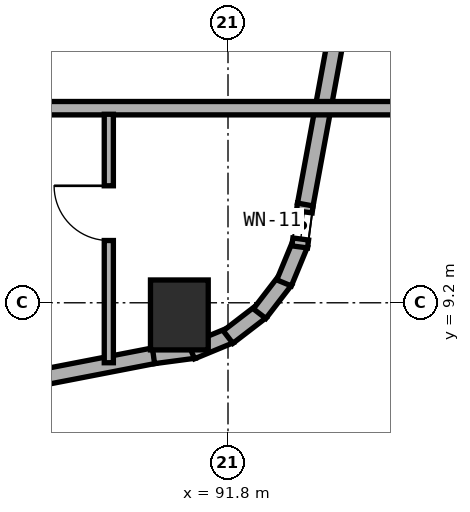
"""IFC4 building model, lengths in metres.
Left out: names, types, materials, properties, quantities, classifications, styles, units other than length and angle.
Written with IfcOpenShell. Run it as: python <this file> out.ifc"""

import sys

from ifc_helpers import new_model, si_unit, direction, frame, frame_2d, origin, origin_2d, place, context, subcontext, project, spatial, rectangle, extrude, element, fill, save


model = new_model("IFC4")
c1 = context("Model", 3, precision=1e-05, world=origin(), true_north=direction((0.0, 1.0)))
c2 = subcontext(c1, "Body", "Model", "MODEL_VIEW")
j1 = project(units=[si_unit("LENGTHUNIT", "METRE"), si_unit("PLANEANGLEUNIT", "RADIAN")], contexts=[c1])
p1 = place(None, origin())
s1 = spatial("IfcSite", under=j1, at=p1, CompositionType="ELEMENT")
p2 = place(p1, origin())
s2 = spatial("IfcBuilding", under=s1, at=p2, CompositionType="ELEMENT")
p3 = place(p2, frame((0.0, 0.0, 124.0)))
s3 = spatial("IfcBuildingStorey", under=s2, at=p3, CompositionType="ELEMENT", Elevation=124.0)
p4 = place(p3, frame((91.0, 9.0, 0.0), z_axis=(0.0, 0.0, 1.0), x_axis=(1.0, 0.0, 0.0)))
e1 = element("IfcColumn", 1, at=p4, inside=s3, PredefinedType="COLUMN", context=c2, shape_type="SweptSolid", body=[
    extrude(rectangle(XDim=0.95, YDim=1.15, at=origin_2d()), origin(), (0.0, 0.0, 1.0), 3.5),
])
p5 = place(p3, frame((82.29, 6.723, 0.0), z_axis=(0.0, 0.0, 1.0), x_axis=(0.981733729692, 0.190260043057, 0.0)))
e2 = element("IfcWall", 2, at=p5, inside=s3, PredefinedType="STANDARD", context=c2, shape_type="SweptSolid", body=[
    extrude(rectangle(XDim=8.447, YDim=0.26, at=frame_2d((4.224, 0.0))), origin(), (0.0, 0.0, 1.0), 3.25),
])
p6 = place(p5, frame((2.608, 0.0, 0.8)))
e3 = element("IfcOpeningElement", 3, at=p6, cuts=e2, PredefinedType="OPENING", context=c2, shape_type="SweptSolid", body=[
    extrude(rectangle(XDim=2.4, YDim=1.6, at=frame_2d((1.2, 0.8))), frame((0.0, 0.14, 0.0), z_axis=(0.0, -1.0, 0.0), x_axis=(1.0, 0.0, 0.0)), (0.0, 0.0, 1.0), 0.28),
])
p7 = place(p3, frame((90.575, 8.328, 0.0), z_axis=(0.0, 0.0, 1.0), x_axis=(0.991300187529, 0.13162043232, 0.0)))
e4 = element("IfcWall", 4, at=p7, inside=s3, PredefinedType="STANDARD", context=c2, shape_type="SweptSolid", body=[
    extrude(rectangle(XDim=0.677, YDim=0.26, at=frame_2d((0.338, 0.0))), origin(), (0.0, 0.0, 1.0), 3.25),
])
for number, where, z_axis, x_axis in (
    (5, (91.2, 8.399, 0.0), (0.0, 0.0, 1.0), (0.924, 0.382, 0.0)),
    (6, (91.801, 8.636, 0.0), (0.0, 0.0, 1.0), (0.793, 0.61, 0.0)),
    (7, (92.32, 9.021, 0.0), (0.0, 0.0, 1.0), (0.609, 0.793, 0.0)),
):
    element("IfcWall", number, at=place(p3, frame(where, z_axis=z_axis, x_axis=x_axis)), inside=s3, PredefinedType="STANDARD", context=c2, shape_type="SweptSolid", body=[
        extrude(rectangle(XDim=0.694, YDim=0.26, at=frame_2d((0.347, 0.0))), origin(), (0.0, 0.0, 1.0), 3.25),
    ])
p8 = place(p3, frame((92.722, 9.527, 0.0), z_axis=(0.0, 0.0, 1.0), x_axis=(0.382289608286, 0.924042561464, 0.0)))
e8 = element("IfcWall", 8, at=p8, inside=s3, PredefinedType="STANDARD", context=c2, shape_type="SweptSolid", body=[
    extrude(rectangle(XDim=0.694, YDim=0.26, at=frame_2d((0.347, 0.0))), origin(), (0.0, 0.0, 1.0), 3.25),
])
p9 = place(p3, frame((92.979, 10.119, 0.0), z_axis=(0.0, 0.0, 1.0), x_axis=(0.130614135366, 0.991433279471, 0.0)))
e9 = element("IfcWall", 9, at=p9, inside=s3, PredefinedType="STANDARD", context=c2, shape_type="SweptSolid", body=[
    extrude(rectangle(XDim=0.712, YDim=0.26, at=frame_2d((0.356, 0.0))), origin(), (0.0, 0.0, 1.0), 3.25),
])
p10 = place(p9, frame((0.131, 0.0, 0.85)))
e10 = element("IfcOpeningElement", 10, at=p10, cuts=e9, PredefinedType="OPENING", context=c2, shape_type="SweptSolid", body=[
    extrude(rectangle(XDim=0.45, YDim=1.5, at=frame_2d((0.225, 0.75))), frame((0.0, 0.14, 0.0), z_axis=(0.0, -1.0, 0.0), x_axis=(1.0, 0.0, 0.0)), (0.0, 0.0, 1.0), 0.28),
])
p11 = place(p3, frame((93.071, 10.816, 0.0), z_axis=(0.0, 0.0, 1.0), x_axis=(0.181209963057, 0.983444431215, 0.0)))
e11 = element("IfcWall", 11, at=p11, inside=s3, PredefinedType="STANDARD", context=c2, shape_type="SweptSolid", body=[
    extrude(rectangle(XDim=8.889, YDim=0.26, at=frame_2d((4.445, 0.0))), origin(), (0.0, 0.0, 1.0), 3.25),
])
p12 = place(p11, frame((5.045, 0.0, 0.8)))
e12 = element("IfcOpeningElement", 12, at=p12, cuts=e11, PredefinedType="OPENING", context=c2, shape_type="SweptSolid", body=[
    extrude(rectangle(XDim=2.4, YDim=1.6, at=frame_2d((1.2, 0.8))), frame((0.0, 0.14, 0.0), z_axis=(0.0, -1.0, 0.0), x_axis=(1.0, 0.0, 0.0)), (0.0, 0.0, 1.0), 0.28),
])
p13 = place(p3, frame((88.35, 12.4, 0.0), z_axis=(0.0, 0.0, 1.0), x_axis=(1.0, 0.0, 0.0)))
e13 = element("IfcWall", 13, at=p13, inside=s3, PredefinedType="SOLIDWALL", context=c2, shape_type="SweptSolid", body=[
    extrude(rectangle(XDim=6.29, YDim=0.22, at=frame_2d((3.145, 0.0))), origin(), (0.0, 0.0, 1.0), 2.945),
])
p14 = place(p3, frame((89.84, 8.214, 0.0), z_axis=(0.0, 0.0, 1.0), x_axis=(0.0, 1.0, 0.0)))
e14 = element("IfcWall", 14, at=p14, inside=s3, PredefinedType="PARTITIONING", context=c2, shape_type="SweptSolid", body=[
    extrude(rectangle(XDim=4.086, YDim=0.15, at=frame_2d((2.043, 0.0))), origin(), (0.0, 0.0, 1.0), 2.945),
])
p15 = place(p14, frame((2.01, 0.0, 0.0)))
e15 = element("IfcOpeningElement", 15, at=p15, cuts=e14, PredefinedType="OPENING", context=c2, shape_type="SweptSolid", body=[
    extrude(rectangle(XDim=0.9, YDim=2.1, at=frame_2d((0.45, 1.05))), frame((0.0, 0.085, 0.0), z_axis=(0.0, -1.0, 0.0), x_axis=(1.0, 0.0, 0.0)), (0.0, 0.0, 1.0), 0.17),
])
p16 = place(p10, origin())
e16 = element("IfcWindow", 16, at=p16, inside=s3, PartitioningType="SINGLE_PANEL", PredefinedType="WINDOW", context=c2, shape_type="SweptSolid", body=[
    extrude(rectangle(XDim=0.45, YDim=1.5, at=frame_2d((0.225, 0.75))), frame((0.0, 0.03, 0.0), z_axis=(0.0, -1.0, 0.0), x_axis=(1.0, 0.0, 0.0)), (0.0, 0.0, 1.0), 0.06),
])
fill(e10, e16)
p17 = place(p15, origin())
e17 = element("IfcDoor", 17, at=p17, inside=s3, OperationType="SINGLE_SWING_RIGHT", PredefinedType="DOOR", context=c2, shape_type="SweptSolid", body=[
    extrude(rectangle(XDim=0.9, YDim=2.1, at=frame_2d((0.45, 1.05))), frame((0.0, 0.025, 0.0), z_axis=(0.0, -1.0, 0.0), x_axis=(1.0, 0.0, 0.0)), (0.0, 0.0, 1.0), 0.05),
])
fill(e15, e17)
save(model, sys.argv[1])
